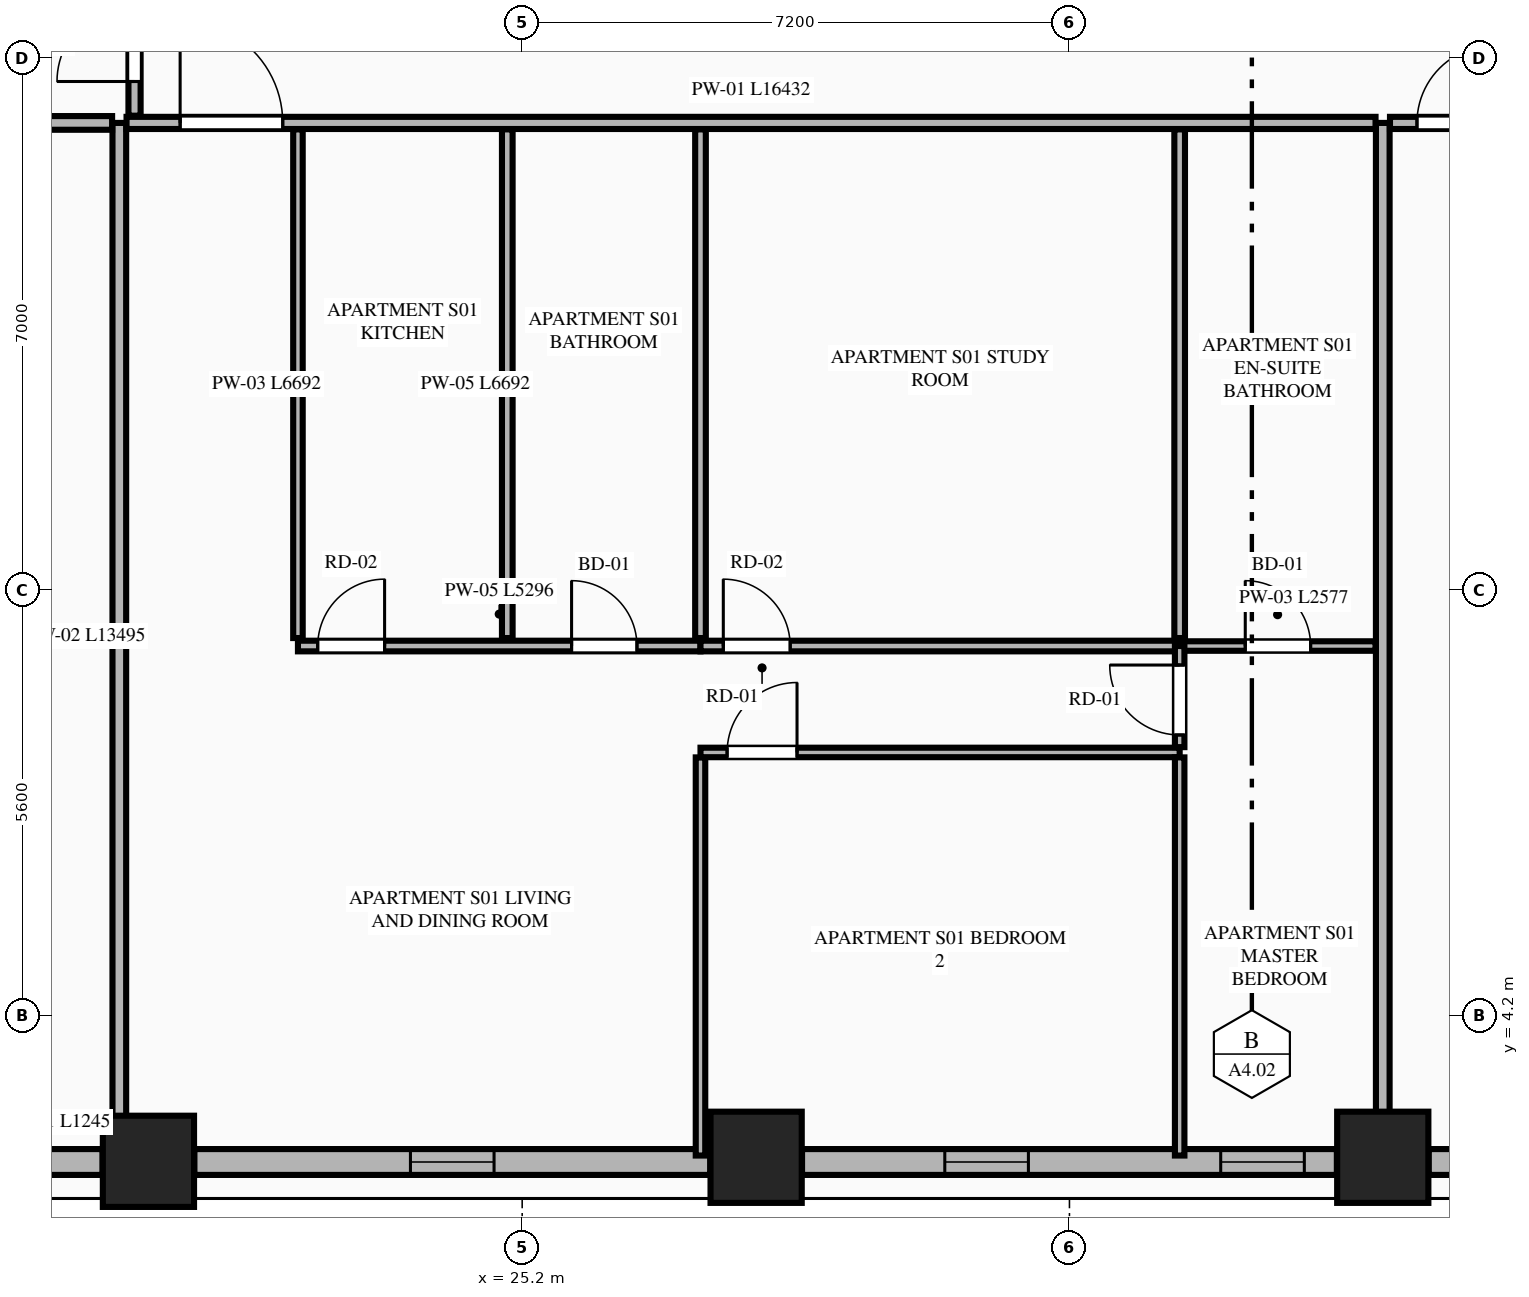
"""IFC4 building model, lengths in metres.
Left out: names, types, materials, properties, quantities, classifications, styles, units other than length and angle.
Written with IfcOpenShell. Run it as: python <this file> out.ifc"""

import sys

from ifc_helpers import new_model, si_unit, direction, frame, frame_2d, origin, origin_2d, place, context, subcontext, project, spatial, rectangle, extrude, element, fill, save


model = new_model("IFC4")
c1 = context("Model", 3, precision=1e-05, world=origin(), true_north=direction((0.0, 1.0)))
c2 = subcontext(c1, "Body", "Model", "MODEL_VIEW")
j1 = project(units=[si_unit("LENGTHUNIT", "METRE"), si_unit("PLANEANGLEUNIT", "RADIAN")], contexts=[c1])
p1 = place(None, origin())
s1 = spatial("IfcSite", under=j1, at=p1, CompositionType="ELEMENT")
p2 = place(p1, origin())
s2 = spatial("IfcBuilding", under=s1, at=p2, CompositionType="ELEMENT")
p3 = place(p2, frame((0.0, 0.0, 56.85)))
s3 = spatial("IfcBuildingStorey", under=s2, at=p3, CompositionType="ELEMENT", Elevation=56.85)
for number, where, z_axis, x_axis in (
    (1, (20.283, 2.289, 0.0), (0.0, 0.0, 1.0), (1.0, 0.0, 0.0)),
    (2, (28.278, 2.342, 0.0), (0.0, 0.0, 1.0), (1.0, 0.0, 0.0)),
    (3, (36.522, 2.342, 0.0), (0.0, 0.0, 1.0), (1.0, 0.0, 0.0)),
):
    element("IfcColumn", number, at=place(p3, frame(where, z_axis=z_axis, x_axis=x_axis)), inside=s3, PredefinedType="COLUMN", context=c2, shape_type="SweptSolid", body=[
        extrude(rectangle(XDim=1.2, YDim=1.2, at=origin_2d()), origin(), (0.0, 0.0, 1.0), 3.55),
    ])
p4 = place(p3, frame((18.434, 2.28, 0.0), z_axis=(0.0, 0.0, 1.0), x_axis=(1.0, 0.0, 0.0)))
e4 = element("IfcWall", 4, at=p4, inside=s3, PredefinedType="STANDARD", context=c2, shape_type="SweptSolid", body=[
    extrude(rectangle(XDim=1.245, YDim=0.34, at=frame_2d((0.623, 0.0))), origin(), (0.0, 0.0, 1.0), 3.33),
])
p5 = place(p3, frame((20.887, 2.28, 0.0), z_axis=(0.0, 0.0, 1.0), x_axis=(1.0, 0.0, 0.0)))
e5 = element("IfcWall", 5, at=p5, inside=s3, PredefinedType="STANDARD", context=c2, shape_type="SweptSolid", body=[
    extrude(rectangle(XDim=6.787, YDim=0.34, at=frame_2d((3.394, 0.0))), origin(), (0.0, 0.0, 1.0), 2.787),
])
p6 = place(p5, frame((2.843, 0.0, 0.75)))
e6 = element("IfcOpeningElement", 6, at=p6, cuts=e5, PredefinedType="OPENING", context=c2, shape_type="SweptSolid", body=[
    extrude(rectangle(XDim=1.1, YDim=1.887, at=frame_2d((0.55, 0.943))), frame((0.0, 0.18, 0.0), z_axis=(0.0, -1.0, 0.0), x_axis=(1.0, 0.0, 0.0)), (0.0, 0.0, 1.0), 0.36),
])
p7 = place(p3, frame((28.882, 2.28, 0.0), z_axis=(0.0, 0.0, 1.0), x_axis=(1.0, 0.0, 0.0)))
e7 = element("IfcWall", 7, at=p7, inside=s3, PredefinedType="STANDARD", context=c2, shape_type="SweptSolid", body=[
    extrude(rectangle(XDim=7.036, YDim=0.34, at=frame_2d((3.518, 0.0))), origin(), (0.0, 0.0, 1.0), 2.787),
])
p8 = place(p7, frame((1.878, 0.0, 0.75)))
e8 = element("IfcOpeningElement", 8, at=p8, cuts=e7, PredefinedType="OPENING", context=c2, shape_type="SweptSolid", body=[
    extrude(rectangle(XDim=1.1, YDim=1.887, at=frame_2d((0.55, 0.943))), frame((0.0, 0.18, 0.0), z_axis=(0.0, -1.0, 0.0), x_axis=(1.0, 0.0, 0.0)), (0.0, 0.0, 1.0), 0.36),
])
p9 = place(p7, frame((5.508, 0.0, 0.75)))
e9 = element("IfcOpeningElement", 9, at=p9, cuts=e7, PredefinedType="OPENING", context=c2, shape_type="SweptSolid", body=[
    extrude(rectangle(XDim=1.1, YDim=1.887, at=frame_2d((0.55, 0.943))), frame((0.0, 0.18, 0.0), z_axis=(0.0, -1.0, 0.0), x_axis=(1.0, 0.0, 0.0)), (0.0, 0.0, 1.0), 0.36),
])
p10 = place(p3, frame((37.126, 2.28, 0.0), z_axis=(0.0, 0.0, 1.0), x_axis=(1.0, 0.0, 0.0)))
e10 = element("IfcWall", 10, at=p10, inside=s3, PredefinedType="STANDARD", context=c2, shape_type="SweptSolid", body=[
    extrude(rectangle(XDim=6.787, YDim=0.34, at=frame_2d((3.394, 0.0))), origin(), (0.0, 0.0, 1.0), 2.787),
])
p11 = place(p10, frame((2.843, 0.0, 0.75)))
e11 = element("IfcOpeningElement", 11, at=p11, cuts=e10, PredefinedType="OPENING", context=c2, shape_type="SweptSolid", body=[
    extrude(rectangle(XDim=1.1, YDim=1.887, at=frame_2d((0.55, 0.943))), frame((0.0, 0.18, 0.0), z_axis=(0.0, -1.0, 0.0), x_axis=(1.0, 0.0, 0.0)), (0.0, 0.0, 1.0), 0.36),
])
p12 = place(p3, frame((19.9, 2.455, 0.0), z_axis=(0.0, 0.0, 1.0), x_axis=(0.0, 1.0, 0.0)))
e12 = element("IfcWall", 12, at=p12, inside=s3, PredefinedType="PARTITIONING", context=c2, shape_type="SweptSolid", body=[
    extrude(rectangle(XDim=13.495, YDim=0.18, at=frame_2d((6.748, 0.0))), origin(), (0.0, 0.0, 1.0), 3.33),
])
p13 = place(p3, frame((36.522, 2.455, 0.0), z_axis=(0.0, 0.0, 1.0), x_axis=(0.0, 1.0, 0.0)))
e13 = element("IfcWall", 13, at=p13, inside=s3, PredefinedType="PARTITIONING", context=c2, shape_type="SweptSolid", body=[
    extrude(rectangle(XDim=13.495, YDim=0.18, at=frame_2d((6.748, 0.0))), origin(), (0.0, 0.0, 1.0), 2.7),
])
p14 = place(p3, frame((19.995, 15.95, 0.0), z_axis=(0.0, 0.0, 1.0), x_axis=(1.0, 0.0, 0.0)))
e14 = element("IfcWall", 14, at=p14, inside=s3, PredefinedType="PARTITIONING", context=c2, shape_type="SweptSolid", body=[
    extrude(rectangle(XDim=16.432, YDim=0.16, at=frame_2d((8.216, 0.0))), origin(), (0.0, 0.0, 1.0), 3.33),
])
p15 = place(p14, frame((0.705, 0.0, 0.0)))
e15 = element("IfcOpeningElement", 15, at=p15, cuts=e14, PredefinedType="OPENING", context=c2, shape_type="SweptSolid", body=[
    extrude(rectangle(XDim=1.35, YDim=2.35, at=frame_2d((0.675, 1.175))), frame((0.0, 0.09, 0.0), z_axis=(0.0, -1.0, 0.0), x_axis=(1.0, 0.0, 0.0)), (0.0, 0.0, 1.0), 0.18),
])
p16 = place(p3, frame((22.25, 9.173, 0.0), z_axis=(0.0, 0.0, 1.0), x_axis=(0.0, 1.0, 0.0)))
e16 = element("IfcWall", 16, at=p16, inside=s3, PredefinedType="PARTITIONING", context=c2, shape_type="SweptSolid", body=[
    extrude(rectangle(XDim=6.692, YDim=0.125, at=frame_2d((3.346, 0.0))), origin(), (0.0, 0.0, 1.0), 2.7),
])
p17 = place(p3, frame((22.25, 9.068, 0.0), z_axis=(0.0, 0.0, 1.0), x_axis=(1.0, 0.0, 0.0)))
e17 = element("IfcWall", 17, at=p17, inside=s3, PredefinedType="PLUMBINGWALL", context=c2, shape_type="SweptSolid", body=[
    extrude(rectangle(XDim=5.296, YDim=0.14, at=frame_2d((2.648, 0.0))), origin(), (0.0, 0.0, 1.0), 3.33),
])
p18 = place(p17, frame((3.6, 0.0, 0.0)))
e18 = element("IfcOpeningElement", 18, at=p18, cuts=e17, PredefinedType="OPENING", context=c2, shape_type="SweptSolid", body=[
    extrude(rectangle(XDim=0.86, YDim=2.1, at=frame_2d((0.43, 1.05))), frame((0.0, 0.08, 0.0), z_axis=(0.0, -1.0, 0.0), x_axis=(1.0, 0.0, 0.0)), (0.0, 0.0, 1.0), 0.16),
])
p19 = place(p17, frame((0.26, 0.0, 0.0)))
e19 = element("IfcOpeningElement", 19, at=p19, cuts=e17, PredefinedType="OPENING", context=c2, shape_type="SweptSolid", body=[
    extrude(rectangle(XDim=0.88, YDim=2.15, at=frame_2d((0.44, 1.075))), frame((0.0, 0.08, 0.0), z_axis=(0.0, -1.0, 0.0), x_axis=(1.0, 0.0, 0.0)), (0.0, 0.0, 1.0), 0.16),
])
p20 = place(p3, frame((27.546, 9.068, 0.0), z_axis=(0.0, 0.0, 1.0), x_axis=(1.0, 0.0, 0.0)))
e20 = element("IfcWall", 20, at=p20, inside=s3, PredefinedType="PLUMBINGWALL", context=c2, shape_type="SweptSolid", body=[
    extrude(rectangle(XDim=6.304, YDim=0.14, at=frame_2d((3.152, 0.0))), origin(), (0.0, 0.0, 1.0), 3.33),
])
p21 = place(p20, frame((0.3, 0.0, 0.0)))
e21 = element("IfcOpeningElement", 21, at=p21, cuts=e20, PredefinedType="OPENING", context=c2, shape_type="SweptSolid", body=[
    extrude(rectangle(XDim=0.88, YDim=2.15, at=frame_2d((0.44, 1.075))), frame((0.0, 0.08, 0.0), z_axis=(0.0, -1.0, 0.0), x_axis=(1.0, 0.0, 0.0)), (0.0, 0.0, 1.0), 0.16),
])
p22 = place(p3, frame((33.85, 9.068, 0.0), z_axis=(0.0, 0.0, 1.0), x_axis=(1.0, 0.0, 0.0)))
e22 = element("IfcWall", 22, at=p22, inside=s3, PredefinedType="PARTITIONING", context=c2, shape_type="SweptSolid", body=[
    extrude(rectangle(XDim=2.577, YDim=0.125, at=frame_2d((1.289, 0.0))), origin(), (0.0, 0.0, 1.0), 3.33),
])
p23 = place(p22, frame((0.863, 0.0, 0.0)))
e23 = element("IfcOpeningElement", 23, at=p23, cuts=e22, PredefinedType="OPENING", context=c2, shape_type="SweptSolid", body=[
    extrude(rectangle(XDim=0.86, YDim=2.1, at=frame_2d((0.43, 1.05))), frame((0.0, 0.073, 0.0), z_axis=(0.0, -1.0, 0.0), x_axis=(1.0, 0.0, 0.0)), (0.0, 0.0, 1.0), 0.145),
])
p24 = place(p3, frame((25.004, 9.173, 0.0), z_axis=(0.0, 0.0, 1.0), x_axis=(0.0, 1.0, 0.0)))
e24 = element("IfcWall", 24, at=p24, inside=s3, PredefinedType="PLUMBINGWALL", context=c2, shape_type="SweptSolid", body=[
    extrude(rectangle(XDim=6.692, YDim=0.14, at=frame_2d((3.346, 0.0))), origin(), (0.0, 0.0, 1.0), 3.33),
])
p25 = place(p3, frame((27.546, 2.365, 0.0), z_axis=(0.0, 0.0, 1.0), x_axis=(0.0, 1.0, 0.0)))
e25 = element("IfcWall", 25, at=p25, inside=s3, PredefinedType="PARTITIONING", context=c2, shape_type="SweptSolid", body=[
    extrude(rectangle(XDim=5.238, YDim=0.125, at=frame_2d((2.619, 0.0))), origin(), (0.0, 0.0, 1.0), 3.33),
])
p26 = place(p3, frame((27.546, 7.668, 0.0), z_axis=(0.0, 0.0, 1.0), x_axis=(1.0, 0.0, 0.0)))
e26 = element("IfcWall", 26, at=p26, inside=s3, PredefinedType="PARTITIONING", context=c2, shape_type="SweptSolid", body=[
    extrude(rectangle(XDim=6.304, YDim=0.125, at=frame_2d((3.152, 0.0))), origin(), (0.0, 0.0, 1.0), 3.33),
])
p27 = place(p26, frame((0.35, 0.0, 0.0)))
e27 = element("IfcOpeningElement", 27, at=p27, cuts=e26, PredefinedType="OPENING", context=c2, shape_type="SweptSolid", body=[
    extrude(rectangle(XDim=0.92, YDim=2.15, at=frame_2d((0.46, 1.075))), frame((0.0, 0.073, 0.0), z_axis=(0.0, -1.0, 0.0), x_axis=(1.0, 0.0, 0.0)), (0.0, 0.0, 1.0), 0.145),
])
p28 = place(p3, frame((33.85, 7.738, 0.0), z_axis=(0.0, 0.0, 1.0), x_axis=(0.0, 1.0, 0.0)))
e28 = element("IfcWall", 28, at=p28, inside=s3, PredefinedType="PARTITIONING", context=c2, shape_type="SweptSolid", body=[
    extrude(rectangle(XDim=1.33, YDim=0.125, at=frame_2d((0.665, 0.0))), origin(), (0.0, 0.0, 1.0), 3.33),
])
p29 = place(p28, frame((0.16, 0.0, 0.0)))
e29 = element("IfcOpeningElement", 29, at=p29, cuts=e28, PredefinedType="OPENING", context=c2, shape_type="SweptSolid", body=[
    extrude(rectangle(XDim=0.92, YDim=2.15, at=frame_2d((0.46, 1.075))), frame((0.0, 0.073, 0.0), z_axis=(0.0, -1.0, 0.0), x_axis=(1.0, 0.0, 0.0)), (0.0, 0.0, 1.0), 0.145),
])
for number, where, z_axis, x_axis in (
    (30, (27.546, 9.173, 0.0), (0.0, 0.0, 1.0), (0.0, 1.0, 0.0)),
    (31, (33.85, 9.173, 0.0), (0.0, 0.0, 1.0), (0.0, 1.0, 0.0)),
):
    element("IfcWall", number, at=place(p3, frame(where, z_axis=z_axis, x_axis=x_axis)), inside=s3, PredefinedType="PLUMBINGWALL", context=c2, shape_type="SweptSolid", body=[
        extrude(rectangle(XDim=6.692, YDim=0.14, at=frame_2d((3.346, 0.0))), origin(), (0.0, 0.0, 1.0), 3.33),
    ])
p30 = place(p3, frame((33.85, 2.365, 0.0), z_axis=(0.0, 0.0, 1.0), x_axis=(0.0, 1.0, 0.0)))
e32 = element("IfcWall", 32, at=p30, inside=s3, PredefinedType="PARTITIONING", context=c2, shape_type="SweptSolid", body=[
    extrude(rectangle(XDim=5.238, YDim=0.125, at=frame_2d((2.619, 0.0))), origin(), (0.0, 0.0, 1.0), 3.33),
])
p31 = place(p3, frame((36.617, 15.95, 0.0), z_axis=(0.0, 0.0, 1.0), x_axis=(1.0, 0.0, 0.0)))
e33 = element("IfcWall", 33, at=p31, inside=s3, PredefinedType="PARTITIONING", context=c2, shape_type="SweptSolid", body=[
    extrude(rectangle(XDim=8.188, YDim=0.16, at=frame_2d((4.094, 0.0))), origin(), (0.0, 0.0, 1.0), 3.33),
])
p32 = place(p31, frame((0.355, 0.0, 0.0)))
e34 = element("IfcOpeningElement", 34, at=p32, cuts=e33, PredefinedType="OPENING", context=c2, shape_type="SweptSolid", body=[
    extrude(rectangle(XDim=1.02, YDim=2.25, at=frame_2d((0.51, 1.125))), frame((0.0, 0.09, 0.0), z_axis=(0.0, -1.0, 0.0), x_axis=(1.0, 0.0, 0.0)), (0.0, 0.0, 1.0), 0.18),
])
p33 = place(p3, frame((10.564, 15.95, 0.0), z_axis=(0.0, 0.0, 1.0), x_axis=(1.0, 0.0, 0.0)))
e35 = element("IfcWall", 35, at=p33, inside=s3, PredefinedType="PARTITIONING", context=c2, shape_type="SweptSolid", body=[
    extrude(rectangle(XDim=9.241, YDim=0.18, at=frame_2d((4.621, 0.0))), origin(), (0.0, 0.0, 1.0), 3.33),
])
p34 = place(p3, frame((20.1, 16.045, 0.0), z_axis=(0.0, 0.0, 1.0), x_axis=(0.0, 1.0, 0.0)))
e36 = element("IfcWall", 36, at=p34, inside=s3, PredefinedType="PARTITIONING", context=c2, shape_type="SweptSolid", body=[
    extrude(rectangle(XDim=19.71, YDim=0.16, at=frame_2d((9.855, 0.0))), origin(), (0.0, 0.0, 1.0), 2.7),
])
p35 = place(p34, frame((0.45, 0.0, 0.0)))
e37 = element("IfcOpeningElement", 37, at=p35, cuts=e36, PredefinedType="OPENING", context=c2, shape_type="SweptSolid", body=[
    extrude(rectangle(XDim=1.02, YDim=2.25, at=frame_2d((0.51, 1.125))), frame((0.0, 0.09, 0.0), z_axis=(0.0, -1.0, 0.0), x_axis=(1.0, 0.0, 0.0)), (0.0, 0.0, 1.0), 0.18),
])
p36 = place(p6, origin())
e38 = element("IfcWindow", 38, at=p36, inside=s3, PartitioningType="SINGLE_PANEL", PredefinedType="WINDOW", context=c2, shape_type="SweptSolid", body=[
    extrude(rectangle(XDim=1.1, YDim=1.887, at=frame_2d((0.55, 0.943))), frame((0.0, 0.03, 0.0), z_axis=(0.0, -1.0, 0.0), x_axis=(1.0, 0.0, 0.0)), (0.0, 0.0, 1.0), 0.06),
])
fill(e6, e38)
p37 = place(p8, origin())
e39 = element("IfcWindow", 39, at=p37, inside=s3, PartitioningType="SINGLE_PANEL", PredefinedType="WINDOW", context=c2, shape_type="SweptSolid", body=[
    extrude(rectangle(XDim=1.1, YDim=1.887, at=frame_2d((0.55, 0.943))), frame((0.0, 0.03, 0.0), z_axis=(0.0, -1.0, 0.0), x_axis=(1.0, 0.0, 0.0)), (0.0, 0.0, 1.0), 0.06),
])
fill(e8, e39)
p38 = place(p18, origin())
e40 = element("IfcDoor", 40, at=p38, inside=s3, OperationType="SINGLE_SWING_LEFT", PredefinedType="DOOR", context=c2, shape_type="SweptSolid", body=[
    extrude(rectangle(XDim=0.86, YDim=2.1, at=frame_2d((0.43, 1.05))), frame((0.0, 0.025, 0.0), z_axis=(0.0, -1.0, 0.0), x_axis=(1.0, 0.0, 0.0)), (0.0, 0.0, 1.0), 0.05),
])
fill(e18, e40)
p39 = place(p23, origin())
e41 = element("IfcDoor", 41, at=p39, inside=s3, OperationType="SINGLE_SWING_LEFT", PredefinedType="DOOR", context=c2, shape_type="SweptSolid", body=[
    extrude(rectangle(XDim=0.86, YDim=2.1, at=frame_2d((0.43, 1.05))), frame((0.0, 0.025, 0.0), z_axis=(0.0, -1.0, 0.0), x_axis=(1.0, 0.0, 0.0)), (0.0, 0.0, 1.0), 0.05),
])
fill(e23, e41)
p40 = place(p15, origin())
e42 = element("IfcDoor", 42, at=p40, inside=s3, OperationType="SINGLE_SWING_LEFT", PredefinedType="DOOR", context=c2, shape_type="SweptSolid", body=[
    extrude(rectangle(XDim=1.35, YDim=2.35, at=frame_2d((0.675, 1.175))), frame((0.0, 0.025, 0.0), z_axis=(0.0, -1.0, 0.0), x_axis=(1.0, 0.0, 0.0)), (0.0, 0.0, 1.0), 0.05),
])
fill(e15, e42)
p41 = place(p19, origin())
e43 = element("IfcDoor", 43, at=p41, inside=s3, OperationType="SINGLE_SWING_RIGHT", PredefinedType="DOOR", context=c2, shape_type="SweptSolid", body=[
    extrude(rectangle(XDim=0.88, YDim=2.15, at=frame_2d((0.44, 1.075))), frame((0.0, 0.025, 0.0), z_axis=(0.0, -1.0, 0.0), x_axis=(1.0, 0.0, 0.0)), (0.0, 0.0, 1.0), 0.05),
])
fill(e19, e43)
p42 = place(p21, origin())
e44 = element("IfcDoor", 44, at=p42, inside=s3, OperationType="SINGLE_SWING_LEFT", PredefinedType="DOOR", context=c2, shape_type="SweptSolid", body=[
    extrude(rectangle(XDim=0.88, YDim=2.15, at=frame_2d((0.44, 1.075))), frame((0.0, 0.025, 0.0), z_axis=(0.0, -1.0, 0.0), x_axis=(1.0, 0.0, 0.0)), (0.0, 0.0, 1.0), 0.05),
])
fill(e21, e44)
p43 = place(p27, origin())
e45 = element("IfcDoor", 45, at=p43, inside=s3, OperationType="SINGLE_SWING_RIGHT", PredefinedType="DOOR", context=c2, shape_type="SweptSolid", body=[
    extrude(rectangle(XDim=0.92, YDim=2.15, at=frame_2d((0.46, 1.075))), frame((0.0, 0.025, 0.0), z_axis=(0.0, -1.0, 0.0), x_axis=(1.0, 0.0, 0.0)), (0.0, 0.0, 1.0), 0.05),
])
fill(e27, e45)
p44 = place(p29, origin())
e46 = element("IfcDoor", 46, at=p44, inside=s3, OperationType="SINGLE_SWING_RIGHT", PredefinedType="DOOR", context=c2, shape_type="SweptSolid", body=[
    extrude(rectangle(XDim=0.92, YDim=2.15, at=frame_2d((0.46, 1.075))), frame((0.0, 0.025, 0.0), z_axis=(0.0, -1.0, 0.0), x_axis=(1.0, 0.0, 0.0)), (0.0, 0.0, 1.0), 0.05),
])
fill(e29, e46)
p45 = place(p32, origin())
e47 = element("IfcDoor", 47, at=p45, inside=s3, OperationType="SINGLE_SWING_RIGHT", PredefinedType="DOOR", context=c2, shape_type="SweptSolid", body=[
    extrude(rectangle(XDim=1.02, YDim=2.25, at=frame_2d((0.51, 1.125))), frame((0.0, 0.025, 0.0), z_axis=(0.0, -1.0, 0.0), x_axis=(1.0, 0.0, 0.0)), (0.0, 0.0, 1.0), 0.05),
])
fill(e34, e47)
p46 = place(p35, origin())
e48 = element("IfcDoor", 48, at=p46, inside=s3, OperationType="SINGLE_SWING_LEFT", PredefinedType="DOOR", context=c2, shape_type="SweptSolid", body=[
    extrude(rectangle(XDim=1.02, YDim=2.25, at=frame_2d((0.51, 1.125))), frame((0.0, 0.025, 0.0), z_axis=(0.0, -1.0, 0.0), x_axis=(1.0, 0.0, 0.0)), (0.0, 0.0, 1.0), 0.05),
])
fill(e37, e48)
p47 = place(p9, origin())
e49 = element("IfcWindow", 49, at=p47, inside=s3, PartitioningType="SINGLE_PANEL", PredefinedType="WINDOW", context=c2, shape_type="SweptSolid", body=[
    extrude(rectangle(XDim=1.1, YDim=1.887, at=frame_2d((0.55, 0.943))), frame((0.0, 0.03, 0.0), z_axis=(0.0, -1.0, 0.0), x_axis=(1.0, 0.0, 0.0)), (0.0, 0.0, 1.0), 0.06),
])
fill(e9, e49)
save(model, sys.argv[1])
